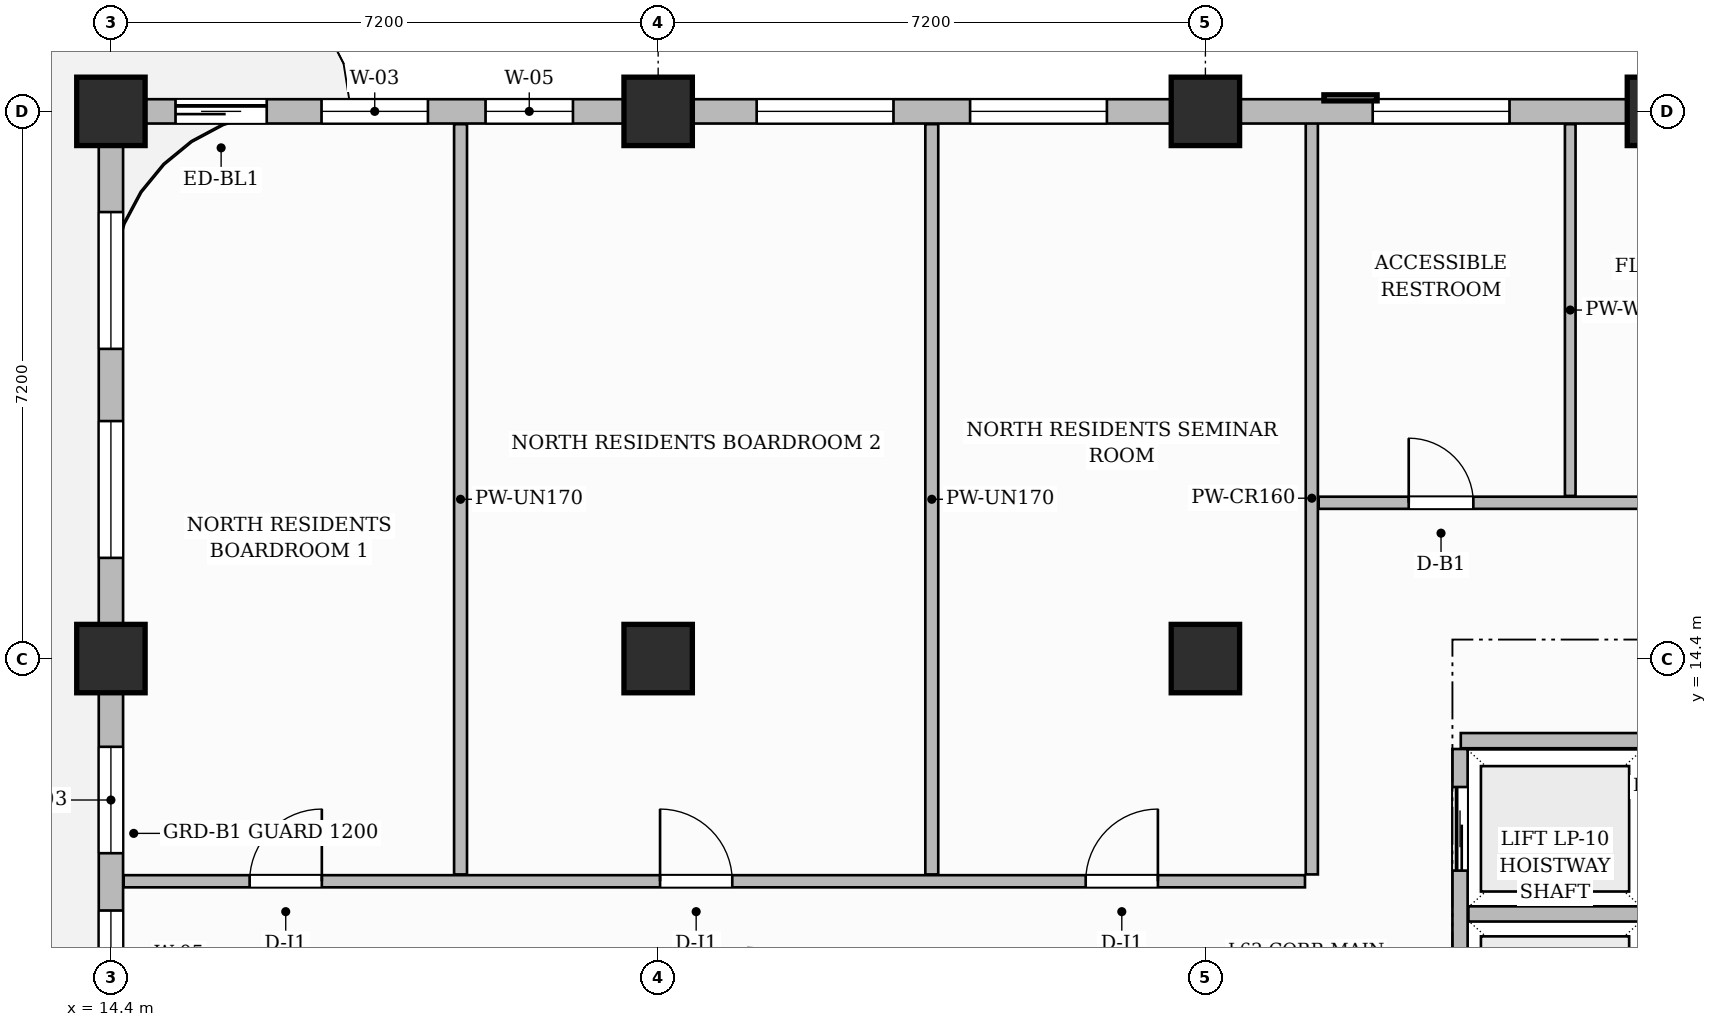
"""IFC4 building model, lengths in metres.
Left out: names, types, materials, properties, quantities, classifications, styles, units other than length and angle.
Written with IfcOpenShell. Run it as: python <this file> out.ifc"""

import sys

from ifc_helpers import new_model, si_unit, direction, frame, frame_2d, origin, origin_2d, place, context, subcontext, project, spatial, rectangle, extrude, source, transform, mapped, element, fill, save


model = new_model("IFC4")
c1 = context("Model", 3, precision=1e-05, world=origin(), true_north=direction((0.0, 1.0)))
c2 = subcontext(c1, "Body", "Model", "MODEL_VIEW")
j1 = project(units=[si_unit("LENGTHUNIT", "METRE"), si_unit("PLANEANGLEUNIT", "RADIAN")], contexts=[c1])
p1 = place(None, origin())
s1 = spatial("IfcSite", under=j1, at=p1, CompositionType="ELEMENT")
p2 = place(p1, origin())
s2 = spatial("IfcBuilding", under=s1, at=p2, CompositionType="ELEMENT")
p3 = place(p2, frame((0.0, 0.0, 248.1)))
s3 = spatial("IfcBuildingStorey", under=s2, at=p3, CompositionType="ELEMENT", Elevation=248.1)
m1 = source(origin(), c2, "Body", "SweptSolid", [
    extrude(rectangle(XDim=0.9, YDim=0.9, at=origin_2d()), origin(), (0.0, 0.0, 1.0), 3.85),
])
for number, where, z_axis, x_axis in (
    (1, (14.4, 14.4, 0.0), (0.0, 0.0, 1.0), (1.0, 0.0, 0.0)),
    (2, (14.4, 21.6, 0.0), (0.0, 0.0, 1.0), (1.0, 0.0, 0.0)),
    (3, (21.6, 14.4, 0.0), (0.0, 0.0, 1.0), (1.0, 0.0, 0.0)),
    (4, (21.6, 21.6, 0.0), (0.0, 0.0, 1.0), (1.0, 0.0, 0.0)),
    (5, (28.8, 14.4, 0.0), (0.0, 0.0, 1.0), (1.0, 0.0, 0.0)),
    (6, (28.8, 21.6, 0.0), (0.0, 0.0, 1.0), (1.0, 0.0, 0.0)),
    (7, (34.8, 21.6, 0.0), (0.0, 0.0, 1.0), (1.0, 0.0, 0.0)),
):
    element("IfcColumn", number, at=place(p3, frame(where, z_axis=z_axis, x_axis=x_axis)), inside=s3, PredefinedType="COLUMN", context=c2, shape_type="MappedRepresentation", body=[
        mapped(m1, transform((0.0, 0.0, 0.0), scale=1.0)),
    ])
p4 = place(p3, frame((32.16, 13.32, 0.0), z_axis=(0.0, 0.0, 1.0), x_axis=(1.0, 0.0, 0.0)))
e8 = element("IfcWall", 8, at=p4, inside=s3, PredefinedType="PARTITIONING", context=c2, shape_type="SweptSolid", body=[
    extrude(rectangle(XDim=2.385, YDim=0.2, at=frame_2d((1.192, 0.0))), origin(), (0.0, 0.0, 1.0), 3.6),
])
p5 = place(p3, frame((32.15, 4.39, 0.0), z_axis=(0.0, 0.0, 1.0), x_axis=(0.0, 1.0, 0.0)))
e9 = element("IfcWall", 9, at=p5, inside=s3, PredefinedType="PARTITIONING", context=c2, shape_type="SweptSolid", body=[
    extrude(rectangle(XDim=8.82, YDim=0.2, at=frame_2d((4.41, 0.0))), origin(), (0.0, 0.0, 1.0), 3.6),
])
p6 = place(p5, frame((0.5, 0.0, 0.0)))
e10 = element("IfcOpeningElement", 10, at=p6, cuts=e9, PredefinedType="OPENING", context=c2, shape_type="SweptSolid", body=[
    extrude(rectangle(XDim=1.1, YDim=2.2, at=frame_2d((0.55, 1.1))), frame((0.0, 0.11, 0.0), z_axis=(0.0, -1.0, 0.0), x_axis=(1.0, 0.0, 0.0)), (0.0, 0.0, 1.0), 0.22),
])
p7 = place(p5, frame((2.74, 0.0, 0.0)))
e11 = element("IfcOpeningElement", 11, at=p7, cuts=e9, PredefinedType="OPENING", context=c2, shape_type="SweptSolid", body=[
    extrude(rectangle(XDim=1.1, YDim=2.2, at=frame_2d((0.55, 1.1))), frame((0.0, 0.11, 0.0), z_axis=(0.0, -1.0, 0.0), x_axis=(1.0, 0.0, 0.0)), (0.0, 0.0, 1.0), 0.22),
])
p8 = place(p5, frame((4.98, 0.0, 0.0)))
e12 = element("IfcOpeningElement", 12, at=p8, cuts=e9, PredefinedType="OPENING", context=c2, shape_type="SweptSolid", body=[
    extrude(rectangle(XDim=1.1, YDim=2.2, at=frame_2d((0.55, 1.1))), frame((0.0, 0.11, 0.0), z_axis=(0.0, -1.0, 0.0), x_axis=(1.0, 0.0, 0.0)), (0.0, 0.0, 1.0), 0.22),
])
p9 = place(p5, frame((7.22, 0.0, 0.0)))
e13 = element("IfcOpeningElement", 13, at=p9, cuts=e9, PredefinedType="OPENING", context=c2, shape_type="SweptSolid", body=[
    extrude(rectangle(XDim=1.1, YDim=2.2, at=frame_2d((0.55, 1.1))), frame((0.0, 0.11, 0.0), z_axis=(0.0, -1.0, 0.0), x_axis=(1.0, 0.0, 0.0)), (0.0, 0.0, 1.0), 0.22),
])
p10 = place(p3, frame((32.26, 11.04, 0.0), z_axis=(0.0, 0.0, 1.0), x_axis=(1.0, 0.0, 0.0)))
e14 = element("IfcWall", 14, at=p10, inside=s3, PredefinedType="PARTITIONING", context=c2, shape_type="SweptSolid", body=[
    extrude(rectangle(XDim=2.255, YDim=0.2, at=frame_2d((1.127, 0.0))), origin(), (0.0, 0.0, 1.0), 3.6),
])
p11 = place(p3, frame((14.568, 11.47, 0.0), z_axis=(0.0, 0.0, 1.0), x_axis=(1.0, 0.0, 0.0)))
e15 = element("IfcWall", 15, at=p11, inside=s3, PredefinedType="PARTITIONING", context=c2, shape_type="SweptSolid", body=[
    extrude(rectangle(XDim=15.542, YDim=0.16, at=frame_2d((7.771, 0.0))), origin(), (0.0, 0.0, 1.0), 3.6),
])
p12 = place(p11, frame((1.657, 0.0, 0.0)))
e16 = element("IfcOpeningElement", 16, at=p12, cuts=e15, PredefinedType="OPENING", context=c2, shape_type="SweptSolid", body=[
    extrude(rectangle(XDim=0.95, YDim=2.15, at=frame_2d((0.475, 1.075))), frame((0.0, 0.09, 0.0), z_axis=(0.0, -1.0, 0.0), x_axis=(1.0, 0.0, 0.0)), (0.0, 0.0, 1.0), 0.18),
])
p13 = place(p11, frame((7.057, 0.0, 0.0)))
e17 = element("IfcOpeningElement", 17, at=p13, cuts=e15, PredefinedType="OPENING", context=c2, shape_type="SweptSolid", body=[
    extrude(rectangle(XDim=0.95, YDim=2.15, at=frame_2d((0.475, 1.075))), frame((0.0, 0.09, 0.0), z_axis=(0.0, -1.0, 0.0), x_axis=(1.0, 0.0, 0.0)), (0.0, 0.0, 1.0), 0.18),
])
p14 = place(p11, frame((12.657, 0.0, 0.0)))
e18 = element("IfcOpeningElement", 18, at=p14, cuts=e15, PredefinedType="OPENING", context=c2, shape_type="SweptSolid", body=[
    extrude(rectangle(XDim=0.95, YDim=2.15, at=frame_2d((0.475, 1.075))), frame((0.0, 0.09, 0.0), z_axis=(0.0, -1.0, 0.0), x_axis=(1.0, 0.0, 0.0)), (0.0, 0.0, 1.0), 0.18),
])
p15 = place(p3, frame((30.2, 11.56, 0.0), z_axis=(0.0, 0.0, 1.0), x_axis=(0.0, 1.0, 0.0)))
e19 = element("IfcWall", 19, at=p15, inside=s3, PredefinedType="PARTITIONING", context=c2, shape_type="SweptSolid", body=[
    extrude(rectangle(XDim=9.9, YDim=0.16, at=frame_2d((4.95, 0.0))), origin(), (0.0, 0.0, 1.0), 3.6),
])
p16 = place(p3, frame((30.29, 16.45, 0.0), z_axis=(0.0, 0.0, 1.0), x_axis=(1.0, 0.0, 0.0)))
e20 = element("IfcWall", 20, at=p16, inside=s3, PredefinedType="PARTITIONING", context=c2, shape_type="SweptSolid", body=[
    extrude(rectangle(XDim=19.37, YDim=0.16, at=frame_2d((9.685, 0.0))), origin(), (0.0, 0.0, 1.0), 3.6),
])
p17 = place(p16, frame((1.185, 0.0, 0.0)))
e21 = element("IfcOpeningElement", 21, at=p17, cuts=e20, PredefinedType="OPENING", context=c2, shape_type="SweptSolid", body=[
    extrude(rectangle(XDim=0.85, YDim=2.1, at=frame_2d((0.425, 1.05))), frame((0.0, 0.09, 0.0), z_axis=(0.0, -1.0, 0.0), x_axis=(1.0, 0.0, 0.0)), (0.0, 0.0, 1.0), 0.18),
])
p18 = place(p16, frame((6.66, 0.0, 0.0)))
e22 = element("IfcOpeningElement", 22, at=p18, cuts=e20, PredefinedType="OPENING", context=c2, shape_type="SweptSolid", body=[
    extrude(rectangle(XDim=0.9, YDim=2.15, at=frame_2d((0.45, 1.075))), frame((0.0, 0.09, 0.0), z_axis=(0.0, -1.0, 0.0), x_axis=(1.0, 0.0, 0.0)), (0.0, 0.0, 1.0), 0.18),
])
p19 = place(p16, frame((14.46, 0.0, 0.0)))
e23 = element("IfcOpeningElement", 23, at=p19, cuts=e20, PredefinedType="OPENING", context=c2, shape_type="SweptSolid", body=[
    extrude(rectangle(XDim=1.4, YDim=2.35, at=frame_2d((0.7, 1.175))), frame((0.0, 0.09, 0.0), z_axis=(0.0, -1.0, 0.0), x_axis=(1.0, 0.0, 0.0)), (0.0, 0.0, 1.0), 0.18),
])
p20 = place(p3, frame((33.6, 16.54, 0.0), z_axis=(0.0, 0.0, 1.0), x_axis=(0.0, 1.0, 0.0)))
e24 = element("IfcWall", 24, at=p20, inside=s3, PredefinedType="PARTITIONING", context=c2, shape_type="SweptSolid", body=[
    extrude(rectangle(XDim=4.892, YDim=0.14, at=frame_2d((2.446, 0.0))), origin(), (0.0, 0.0, 1.0), 3.6),
])
p21 = place(p3, frame((19.0, 11.56, 0.0), z_axis=(0.0, 0.0, 1.0), x_axis=(0.0, 1.0, 0.0)))
e25 = element("IfcWall", 25, at=p21, inside=s3, PredefinedType="PARTITIONING", context=c2, shape_type="SweptSolid", body=[
    extrude(rectangle(XDim=9.872, YDim=0.17, at=frame_2d((4.936, 0.0))), origin(), (0.0, 0.0, 1.0), 3.6),
])
p22 = place(p3, frame((25.2, 11.56, 0.0), z_axis=(0.0, 0.0, 1.0), x_axis=(0.0, 1.0, 0.0)))
e26 = element("IfcWall", 26, at=p22, inside=s3, PredefinedType="PARTITIONING", context=c2, shape_type="SweptSolid", body=[
    extrude(rectangle(XDim=9.872, YDim=0.17, at=frame_2d((4.936, 0.0))), origin(), (0.0, 0.0, 1.0), 3.315),
])
p23 = place(p3, frame((14.4, 21.6, 0.0), z_axis=(0.0, 0.0, 1.0), x_axis=(1.0, 0.0, 0.0)))
e27 = element("IfcWall", 27, at=p23, inside=s3, PredefinedType="SOLIDWALL", context=c2, shape_type="SweptSolid", body=[
    extrude(rectangle(XDim=35.4, YDim=0.32, at=frame_2d((17.7, 0.0))), origin(), (0.0, 0.0, 1.0), 3.135),
])
p24 = place(p23, frame((0.85, 0.0, 0.0)))
e28 = element("IfcOpeningElement", 28, at=p24, cuts=e27, PredefinedType="OPENING", context=c2, shape_type="SweptSolid", body=[
    extrude(rectangle(XDim=1.2, YDim=2.2, at=frame_2d((0.6, 1.1))), frame((0.0, 0.17, 0.0), z_axis=(0.0, -1.0, 0.0), x_axis=(1.0, 0.0, 0.0)), (0.0, 0.0, 1.0), 0.34),
])
p25 = place(p23, frame((2.771, 0.0, 0.8)))
e29 = element("IfcOpeningElement", 29, at=p25, cuts=e27, PredefinedType="OPENING", context=c2, shape_type="SweptSolid", body=[
    extrude(rectangle(XDim=1.4, YDim=1.85, at=frame_2d((0.7, 0.925))), frame((0.0, 0.17, 0.0), z_axis=(0.0, -1.0, 0.0), x_axis=(1.0, 0.0, 0.0)), (0.0, 0.0, 1.0), 0.34),
])
p26 = place(p23, frame((4.929, 0.0, 0.8)))
e30 = element("IfcOpeningElement", 30, at=p26, cuts=e27, PredefinedType="OPENING", context=c2, shape_type="SweptSolid", body=[
    extrude(rectangle(XDim=1.15, YDim=1.8, at=frame_2d((0.575, 0.9))), frame((0.0, 0.17, 0.0), z_axis=(0.0, -1.0, 0.0), x_axis=(1.0, 0.0, 0.0)), (0.0, 0.0, 1.0), 0.34),
])
p27 = place(p23, frame((8.496, 0.0, 0.8)))
e31 = element("IfcOpeningElement", 31, at=p27, cuts=e27, PredefinedType="OPENING", context=c2, shape_type="SweptSolid", body=[
    extrude(rectangle(XDim=1.8, YDim=1.85, at=frame_2d((0.9, 0.925))), frame((0.0, 0.17, 0.0), z_axis=(0.0, -1.0, 0.0), x_axis=(1.0, 0.0, 0.0)), (0.0, 0.0, 1.0), 0.34),
])
p28 = place(p23, frame((11.304, 0.0, 0.8)))
e32 = element("IfcOpeningElement", 32, at=p28, cuts=e27, PredefinedType="OPENING", context=c2, shape_type="SweptSolid", body=[
    extrude(rectangle(XDim=1.8, YDim=1.85, at=frame_2d((0.9, 0.925))), frame((0.0, 0.17, 0.0), z_axis=(0.0, -1.0, 0.0), x_axis=(1.0, 0.0, 0.0)), (0.0, 0.0, 1.0), 0.34),
])
p29 = place(p23, frame((16.601, 0.0, 0.8)))
e33 = element("IfcOpeningElement", 33, at=p29, cuts=e27, PredefinedType="OPENING", context=c2, shape_type="SweptSolid", body=[
    extrude(rectangle(XDim=1.8, YDim=1.85, at=frame_2d((0.9, 0.925))), frame((0.0, 0.17, 0.0), z_axis=(0.0, -1.0, 0.0), x_axis=(1.0, 0.0, 0.0)), (0.0, 0.0, 1.0), 0.34),
])
p30 = place(p23, frame((21.723, 0.0, 0.8)))
e34 = element("IfcOpeningElement", 34, at=p30, cuts=e27, PredefinedType="OPENING", context=c2, shape_type="SweptSolid", body=[
    extrude(rectangle(XDim=1.8, YDim=1.85, at=frame_2d((0.9, 0.925))), frame((0.0, 0.17, 0.0), z_axis=(0.0, -1.0, 0.0), x_axis=(1.0, 0.0, 0.0)), (0.0, 0.0, 1.0), 0.34),
])
p31 = place(p23, frame((24.469, 0.0, 0.8)))
e35 = element("IfcOpeningElement", 35, at=p31, cuts=e27, PredefinedType="OPENING", context=c2, shape_type="SweptSolid", body=[
    extrude(rectangle(XDim=1.8, YDim=1.85, at=frame_2d((0.9, 0.925))), frame((0.0, 0.17, 0.0), z_axis=(0.0, -1.0, 0.0), x_axis=(1.0, 0.0, 0.0)), (0.0, 0.0, 1.0), 0.34),
])
p32 = place(p23, frame((29.075, 0.0, 0.8)))
e36 = element("IfcOpeningElement", 36, at=p32, cuts=e27, PredefinedType="OPENING", context=c2, shape_type="SweptSolid", body=[
    extrude(rectangle(XDim=1.8, YDim=1.85, at=frame_2d((0.9, 0.925))), frame((0.0, 0.17, 0.0), z_axis=(0.0, -1.0, 0.0), x_axis=(1.0, 0.0, 0.0)), (0.0, 0.0, 1.0), 0.34),
])
p33 = place(p23, frame((32.125, 0.0, 0.8)))
e37 = element("IfcOpeningElement", 37, at=p33, cuts=e27, PredefinedType="OPENING", context=c2, shape_type="SweptSolid", body=[
    extrude(rectangle(XDim=1.8, YDim=1.85, at=frame_2d((0.9, 0.925))), frame((0.0, 0.17, 0.0), z_axis=(0.0, -1.0, 0.0), x_axis=(1.0, 0.0, 0.0)), (0.0, 0.0, 1.0), 0.34),
])
p34 = place(p3, frame((14.4, 0.05, 0.0), z_axis=(0.0, 0.0, 1.0), x_axis=(0.0, 1.0, 0.0)))
e38 = element("IfcWall", 38, at=p34, inside=s3, PredefinedType="SOLIDWALL", context=c2, shape_type="SweptSolid", body=[
    extrude(rectangle(XDim=21.5, YDim=0.32, at=frame_2d((10.75, 0.0))), origin(), (0.0, 0.0, 1.0), 3.6),
])
p35 = place(p34, frame((1.275, 0.0, 0.8)))
e39 = element("IfcOpeningElement", 39, at=p35, cuts=e38, PredefinedType="OPENING", context=c2, shape_type="SweptSolid", body=[
    extrude(rectangle(XDim=1.8, YDim=1.85, at=frame_2d((0.9, 0.925))), frame((0.0, 0.17, 0.0), z_axis=(0.0, -1.0, 0.0), x_axis=(1.0, 0.0, 0.0)), (0.0, 0.0, 1.0), 0.34),
])
p36 = place(p34, frame((4.025, 0.0, 0.8)))
e40 = element("IfcOpeningElement", 40, at=p36, cuts=e38, PredefinedType="OPENING", context=c2, shape_type="SweptSolid", body=[
    extrude(rectangle(XDim=1.8, YDim=1.85, at=frame_2d((0.9, 0.925))), frame((0.0, 0.17, 0.0), z_axis=(0.0, -1.0, 0.0), x_axis=(1.0, 0.0, 0.0)), (0.0, 0.0, 1.0), 0.34),
])
p37 = place(p34, frame((8.246, 0.0, 0.8)))
e41 = element("IfcOpeningElement", 41, at=p37, cuts=e38, PredefinedType="OPENING", context=c2, shape_type="SweptSolid", body=[
    extrude(rectangle(XDim=0.95, YDim=1.75, at=frame_2d((0.475, 0.875))), frame((0.0, 0.17, 0.0), z_axis=(0.0, -1.0, 0.0), x_axis=(1.0, 0.0, 0.0)), (0.0, 0.0, 1.0), 0.34),
])
p38 = place(p34, frame((9.885, 0.0, 0.8)))
e42 = element("IfcOpeningElement", 42, at=p38, cuts=e38, PredefinedType="OPENING", context=c2, shape_type="SweptSolid", body=[
    extrude(rectangle(XDim=1.15, YDim=1.8, at=frame_2d((0.575, 0.9))), frame((0.0, 0.17, 0.0), z_axis=(0.0, -1.0, 0.0), x_axis=(1.0, 0.0, 0.0)), (0.0, 0.0, 1.0), 0.34),
])
p39 = place(p34, frame((11.789, 0.0, 0.8)))
e43 = element("IfcOpeningElement", 43, at=p39, cuts=e38, PredefinedType="OPENING", context=c2, shape_type="SweptSolid", body=[
    extrude(rectangle(XDim=1.4, YDim=1.85, at=frame_2d((0.7, 0.925))), frame((0.0, 0.17, 0.0), z_axis=(0.0, -1.0, 0.0), x_axis=(1.0, 0.0, 0.0)), (0.0, 0.0, 1.0), 0.34),
])
p40 = place(p34, frame((15.675, 0.0, 0.8)))
e44 = element("IfcOpeningElement", 44, at=p40, cuts=e38, PredefinedType="OPENING", context=c2, shape_type="SweptSolid", body=[
    extrude(rectangle(XDim=1.8, YDim=1.85, at=frame_2d((0.9, 0.925))), frame((0.0, 0.17, 0.0), z_axis=(0.0, -1.0, 0.0), x_axis=(1.0, 0.0, 0.0)), (0.0, 0.0, 1.0), 0.34),
])
p41 = place(p34, frame((18.425, 0.0, 0.8)))
e45 = element("IfcOpeningElement", 45, at=p41, cuts=e38, PredefinedType="OPENING", context=c2, shape_type="SweptSolid", body=[
    extrude(rectangle(XDim=1.8, YDim=1.85, at=frame_2d((0.9, 0.925))), frame((0.0, 0.17, 0.0), z_axis=(0.0, -1.0, 0.0), x_axis=(1.0, 0.0, 0.0)), (0.0, 0.0, 1.0), 0.34),
])
m2 = source(origin(), c2, "Body", "SweptSolid", [
    extrude(rectangle(XDim=0.85, YDim=2.1, at=frame_2d((0.425, 1.05))), frame((0.0, 0.025, 0.0), z_axis=(0.0, -1.0, 0.0), x_axis=(1.0, 0.0, 0.0)), (0.0, 0.0, 1.0), 0.05),
])
p42 = place(p17, origin())
e46 = element("IfcDoor", 46, at=p42, inside=s3, OperationType="SINGLE_SWING_LEFT", PredefinedType="DOOR", context=c2, shape_type="MappedRepresentation", body=[
    mapped(m2, transform((0.0, 0.0, 0.0), scale=1.0)),
])
fill(e21, e46)
m3 = source(origin(), c2, "Body", "SweptSolid", [
    extrude(rectangle(XDim=0.95, YDim=2.15, at=frame_2d((0.475, 1.075))), frame((0.0, 0.025, 0.0), z_axis=(0.0, -1.0, 0.0), x_axis=(1.0, 0.0, 0.0)), (0.0, 0.0, 1.0), 0.05),
])
p43 = place(p12, origin())
e47 = element("IfcDoor", 47, at=p43, inside=s3, OperationType="SINGLE_SWING_RIGHT", PredefinedType="DOOR", context=c2, shape_type="MappedRepresentation", body=[
    mapped(m3, transform((0.0, 0.0, 0.0), scale=1.0)),
])
fill(e16, e47)
p44 = place(p13, origin())
e48 = element("IfcDoor", 48, at=p44, inside=s3, OperationType="SINGLE_SWING_LEFT", PredefinedType="DOOR", context=c2, shape_type="MappedRepresentation", body=[
    mapped(m3, transform((0.0, 0.0, 0.0), scale=1.0)),
])
fill(e17, e48)
p45 = place(p14, origin())
e49 = element("IfcDoor", 49, at=p45, inside=s3, OperationType="SINGLE_SWING_RIGHT", PredefinedType="DOOR", context=c2, shape_type="MappedRepresentation", body=[
    mapped(m3, transform((0.0, 0.0, 0.0), scale=1.0)),
])
fill(e18, e49)
m4 = source(origin(), c2, "Body", "SweptSolid", [
    extrude(rectangle(XDim=1.1, YDim=2.2, at=frame_2d((0.55, 1.1))), frame((0.0, 0.025, 0.0), z_axis=(0.0, -1.0, 0.0), x_axis=(1.0, 0.0, 0.0)), (0.0, 0.0, 1.0), 0.05),
])
p46 = place(p9, origin())
e50 = element("IfcDoor", 50, at=p46, inside=s3, OperationType="SLIDING_TO_LEFT", PredefinedType="DOOR", context=c2, shape_type="MappedRepresentation", body=[
    mapped(m4, transform((0.0, 0.0, 0.0), scale=1.0)),
])
fill(e13, e50)
m5 = source(origin(), c2, "Body", "SweptSolid", [
    extrude(rectangle(XDim=1.2, YDim=2.2, at=frame_2d((0.6, 1.1))), frame((0.0, 0.025, 0.0), z_axis=(0.0, -1.0, 0.0), x_axis=(1.0, 0.0, 0.0)), (0.0, 0.0, 1.0), 0.05),
])
p47 = place(p24, origin())
e51 = element("IfcDoor", 51, at=p47, inside=s3, OperationType="SLIDING_TO_LEFT", PredefinedType="DOOR", context=c2, shape_type="MappedRepresentation", body=[
    mapped(m5, transform((0.0, 0.0, 0.0), scale=1.0)),
])
fill(e28, e51)
m6 = source(origin(), c2, "Body", "SweptSolid", [
    extrude(rectangle(XDim=1.4, YDim=1.85, at=frame_2d((0.7, 0.925))), frame((0.0, 0.03, 0.0), z_axis=(0.0, -1.0, 0.0), x_axis=(1.0, 0.0, 0.0)), (0.0, 0.0, 1.0), 0.06),
])
p48 = place(p25, origin())
e52 = element("IfcWindow", 52, at=p48, inside=s3, PartitioningType="SINGLE_PANEL", PredefinedType="WINDOW", context=c2, shape_type="MappedRepresentation", body=[
    mapped(m6, transform((0.0, 0.0, 0.0), scale=1.0)),
])
fill(e29, e52)
m7 = source(origin(), c2, "Body", "SweptSolid", [
    extrude(rectangle(XDim=1.15, YDim=1.8, at=frame_2d((0.575, 0.9))), frame((0.0, 0.03, 0.0), z_axis=(0.0, -1.0, 0.0), x_axis=(1.0, 0.0, 0.0)), (0.0, 0.0, 1.0), 0.06),
])
p49 = place(p26, origin())
e53 = element("IfcWindow", 53, at=p49, inside=s3, PartitioningType="SINGLE_PANEL", PredefinedType="WINDOW", context=c2, shape_type="MappedRepresentation", body=[
    mapped(m7, transform((0.0, 0.0, 0.0), scale=1.0)),
])
fill(e30, e53)
m8 = source(origin(), c2, "Body", "SweptSolid", [
    extrude(rectangle(XDim=1.8, YDim=1.85, at=frame_2d((0.9, 0.925))), frame((0.0, 0.03, 0.0), z_axis=(0.0, -1.0, 0.0), x_axis=(1.0, 0.0, 0.0)), (0.0, 0.0, 1.0), 0.06),
])
p50 = place(p27, origin())
e54 = element("IfcWindow", 54, at=p50, inside=s3, PartitioningType="DOUBLE_PANEL_VERTICAL", PredefinedType="WINDOW", context=c2, shape_type="MappedRepresentation", body=[
    mapped(m8, transform((0.0, 0.0, 0.0), scale=1.0)),
])
fill(e31, e54)
p51 = place(p28, origin())
e55 = element("IfcWindow", 55, at=p51, inside=s3, PartitioningType="DOUBLE_PANEL_VERTICAL", PredefinedType="WINDOW", context=c2, shape_type="MappedRepresentation", body=[
    mapped(m8, transform((0.0, 0.0, 0.0), scale=1.0)),
])
fill(e32, e55)
p52 = place(p29, origin())
e56 = element("IfcWindow", 56, at=p52, inside=s3, PartitioningType="DOUBLE_PANEL_VERTICAL", PredefinedType="WINDOW", context=c2, shape_type="MappedRepresentation", body=[
    mapped(m8, transform((0.0, 0.0, 0.0), scale=1.0)),
])
fill(e33, e56)
p53 = place(p38, origin())
e57 = element("IfcWindow", 57, at=p53, inside=s3, PartitioningType="SINGLE_PANEL", PredefinedType="WINDOW", context=c2, shape_type="MappedRepresentation", body=[
    mapped(m7, transform((0.0, 0.0, 0.0), scale=1.0)),
])
fill(e42, e57)
p54 = place(p39, origin())
e58 = element("IfcWindow", 58, at=p54, inside=s3, PartitioningType="SINGLE_PANEL", PredefinedType="WINDOW", context=c2, shape_type="MappedRepresentation", body=[
    mapped(m6, transform((0.0, 0.0, 0.0), scale=1.0)),
])
fill(e43, e58)
p55 = place(p40, origin())
e59 = element("IfcWindow", 59, at=p55, inside=s3, PartitioningType="DOUBLE_PANEL_VERTICAL", PredefinedType="WINDOW", context=c2, shape_type="MappedRepresentation", body=[
    mapped(m8, transform((0.0, 0.0, 0.0), scale=1.0)),
])
fill(e44, e59)
p56 = place(p41, origin())
e60 = element("IfcWindow", 60, at=p56, inside=s3, PartitioningType="DOUBLE_PANEL_VERTICAL", PredefinedType="WINDOW", context=c2, shape_type="MappedRepresentation", body=[
    mapped(m8, transform((0.0, 0.0, 0.0), scale=1.0)),
])
fill(e45, e60)
save(model, sys.argv[1])
